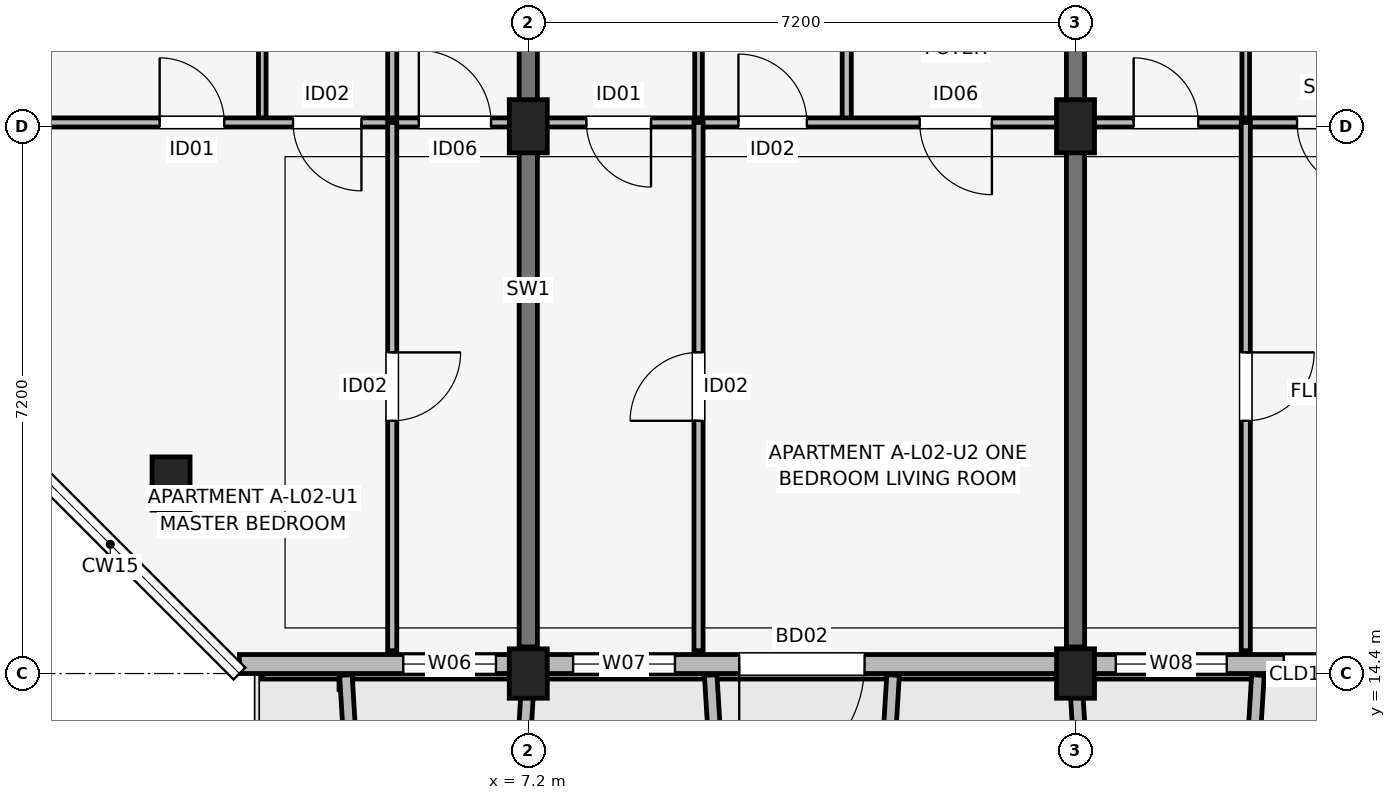
"""IFC4 building model, lengths in metres.
Left out: names, types, materials, properties, quantities, classifications, styles, units other than length and angle.
Written with IfcOpenShell. Run it as: python <this file> out.ifc"""

import sys

from ifc_helpers import new_model, si_unit, direction, frame, frame_2d, origin, origin_2d, place, context, subcontext, project, spatial, rectangle, extrude, element, fill, save


model = new_model("IFC4")
c1 = context("Model", 3, precision=1e-05, world=origin(), true_north=direction((0.0, 1.0)))
c2 = subcontext(c1, "Body", "Model", "MODEL_VIEW")
j1 = project(units=[si_unit("LENGTHUNIT", "METRE"), si_unit("PLANEANGLEUNIT", "RADIAN")], contexts=[c1])
p1 = place(None, origin())
s1 = spatial("IfcSite", under=j1, at=p1, CompositionType="ELEMENT")
p2 = place(p1, origin())
s2 = spatial("IfcBuilding", under=s1, at=p2, CompositionType="ELEMENT")
p3 = place(p2, frame((0.0, 0.0, 8.7)))
s3 = spatial("IfcBuildingStorey", under=s2, at=p3, CompositionType="ELEMENT", Elevation=8.7)
p4 = place(p3, frame((2.5, 16.9, 0.0), z_axis=(0.0, 0.0, 1.0), x_axis=(1.0, 0.0, 0.0)))
e1 = element("IfcColumn", 1, at=p4, inside=s3, PredefinedType="COLUMN", context=c2, shape_type="SweptSolid", body=[
    extrude(rectangle(XDim=0.5, YDim=0.7, at=origin_2d()), origin(), (0.0, 0.0, 1.0), 3.15),
])
p5 = place(p3, frame((7.2, 14.4, 0.0), z_axis=(0.0, 0.0, 1.0), x_axis=(1.0, 0.0, 0.0)))
e2 = element("IfcColumn", 2, at=p5, inside=s3, PredefinedType="COLUMN", context=c2, shape_type="SweptSolid", body=[
    extrude(rectangle(XDim=0.5, YDim=0.65, at=origin_2d()), origin(), (0.0, 0.0, 1.0), 3.15),
])
p6 = place(p3, frame((7.2, 21.6, 0.0), z_axis=(0.0, 0.0, 1.0), x_axis=(1.0, 0.0, 0.0)))
e3 = element("IfcColumn", 3, at=p6, inside=s3, PredefinedType="COLUMN", context=c2, shape_type="SweptSolid", body=[
    extrude(rectangle(XDim=0.5, YDim=0.7, at=origin_2d()), origin(), (0.0, 0.0, 1.0), 3.15),
])
p7 = place(p3, frame((14.4, 14.4, 0.0), z_axis=(0.0, 0.0, 1.0), x_axis=(1.0, 0.0, 0.0)))
e4 = element("IfcColumn", 4, at=p7, inside=s3, PredefinedType="COLUMN", context=c2, shape_type="SweptSolid", body=[
    extrude(rectangle(XDim=0.5, YDim=0.65, at=origin_2d()), origin(), (0.0, 0.0, 1.0), 3.15),
])
p8 = place(p3, frame((14.4, 21.6, 0.0), z_axis=(0.0, 0.0, 1.0), x_axis=(1.0, 0.0, 0.0)))
e5 = element("IfcColumn", 5, at=p8, inside=s3, PredefinedType="COLUMN", context=c2, shape_type="SweptSolid", body=[
    extrude(rectangle(XDim=0.5, YDim=0.7, at=origin_2d()), origin(), (0.0, 0.0, 1.0), 3.15),
])
for number, where, z_axis, x_axis in (
    (6, (7.2, 14.75, 0.0), (0.0, 0.0, 1.0), (0.0, 1.0, 0.0)),
    (7, (14.4, 14.75, 0.0), (0.0, 0.0, 1.0), (0.0, 1.0, 0.0)),
):
    element("IfcWall", number, at=place(p3, frame(where, z_axis=z_axis, x_axis=x_axis)), inside=s3, PredefinedType="SHEAR", context=c2, shape_type="SweptSolid", body=[
        extrude(rectangle(XDim=9.4, YDim=0.24, at=frame_2d((4.7, 0.0))), origin(), (0.0, 0.0, 1.0), 3.15),
    ])
p9 = place(p3, frame((3.4, 14.525, 0.0), z_axis=(0.0, 0.0, 1.0), x_axis=(1.0, 0.0, 0.0)))
e8 = element("IfcWall", 8, at=p9, inside=s3, PredefinedType="SOLIDWALL", context=c2, shape_type="SweptSolid", body=[
    extrude(rectangle(XDim=29.2, YDim=0.25, at=frame_2d((14.6, 0.0))), origin(), (0.0, 0.0, 1.0), 2.43),
])
p10 = place(p9, frame((8.225, 0.0, 0.0), z_axis=(0.0, 0.0, 1.0), x_axis=(-1.0, 0.0, 0.0)))
e9 = element("IfcOpeningElement", 9, at=p10, cuts=e8, PredefinedType="OPENING", context=c2, shape_type="SweptSolid", body=[
    extrude(rectangle(XDim=1.65, YDim=2.15, at=frame_2d((0.825, 1.075))), frame((0.0, 0.135, 0.0), z_axis=(0.0, -1.0, 0.0), x_axis=(1.0, 0.0, 0.0)), (0.0, 0.0, 1.0), 0.27),
])
p11 = place(p9, frame((22.55, 0.0, 0.0), z_axis=(0.0, 0.0, 1.0), x_axis=(-1.0, 0.0, 0.0)))
e10 = element("IfcOpeningElement", 10, at=p11, cuts=e8, PredefinedType="OPENING", context=c2, shape_type="SweptSolid", body=[
    extrude(rectangle(XDim=1.5, YDim=2.15, at=frame_2d((0.75, 1.075))), frame((0.0, 0.135, 0.0), z_axis=(0.0, -1.0, 0.0), x_axis=(1.0, 0.0, 0.0)), (0.0, 0.0, 1.0), 0.27),
])
p12 = place(p9, frame((2.155, 0.0, 0.75)))
e11 = element("IfcOpeningElement", 11, at=p12, cuts=e8, PredefinedType="OPENING", context=c2, shape_type="SweptSolid", body=[
    extrude(rectangle(XDim=1.22, YDim=1.5, at=frame_2d((0.61, 0.75))), frame((0.0, 0.135, 0.0), z_axis=(0.0, -1.0, 0.0), x_axis=(1.0, 0.0, 0.0)), (0.0, 0.0, 1.0), 0.27),
])
p13 = place(p9, frame((4.39, 0.0, 0.75)))
e12 = element("IfcOpeningElement", 12, at=p13, cuts=e8, PredefinedType="OPENING", context=c2, shape_type="SweptSolid", body=[
    extrude(rectangle(XDim=1.34, YDim=1.55, at=frame_2d((0.67, 0.775))), frame((0.0, 0.135, 0.0), z_axis=(0.0, -1.0, 0.0), x_axis=(1.0, 0.0, 0.0)), (0.0, 0.0, 1.0), 0.27),
])
p14 = place(p9, frame((11.53, 0.0, 0.75)))
e13 = element("IfcOpeningElement", 13, at=p14, cuts=e8, PredefinedType="OPENING", context=c2, shape_type="SweptSolid", body=[
    extrude(rectangle(XDim=1.46, YDim=1.55, at=frame_2d((0.73, 0.775))), frame((0.0, 0.135, 0.0), z_axis=(0.0, -1.0, 0.0), x_axis=(1.0, 0.0, 0.0)), (0.0, 0.0, 1.0), 0.27),
])
p15 = place(p9, frame((13.74, 0.0, 0.7)))
e14 = element("IfcOpeningElement", 14, at=p15, cuts=e8, PredefinedType="OPENING", context=c2, shape_type="SweptSolid", body=[
    extrude(rectangle(XDim=1.72, YDim=1.6, at=frame_2d((0.86, 0.8))), frame((0.0, 0.135, 0.0), z_axis=(0.0, -1.0, 0.0), x_axis=(1.0, 0.0, 0.0)), (0.0, 0.0, 1.0), 0.27),
])
p16 = place(p9, frame((26.205, 0.0, 0.75)))
e15 = element("IfcOpeningElement", 15, at=p16, cuts=e8, PredefinedType="OPENING", context=c2, shape_type="SweptSolid", body=[
    extrude(rectangle(XDim=0.72, YDim=1.35, at=frame_2d((0.36, 0.675))), frame((0.0, 0.135, 0.0), z_axis=(0.0, -1.0, 0.0), x_axis=(1.0, 0.0, 0.0)), (0.0, 0.0, 1.0), 0.27),
])
for number, where, z_axis, x_axis in (
    (16, (4.8, 14.38, 0.0), (0.0, 0.0, 1.0), (0.061, -0.998, 0.0)),
    (17, (7.2, 14.38, 0.0), (0.0, 0.0, 1.0), (-0.061, -0.998, 0.0)),
):
    element("IfcWall", number, at=place(p3, frame(where, z_axis=z_axis, x_axis=x_axis)), inside=s3, PredefinedType="ELEMENTEDWALL", context=c2, shape_type="SweptSolid", body=[
        extrude(rectangle(XDim=1.964, YDim=0.165, at=frame_2d((0.982, 0.0))), origin(), (0.0, 0.0, 1.0), 2.95),
    ])
for number, where, z_axis, x_axis in (
    (18, (9.6, 14.38, 0.0), (0.0, 0.0, 1.0), (0.061, -0.998, 0.0)),
    (19, (12.0, 14.38, 0.0), (0.0, 0.0, 1.0), (-0.061, -0.998, 0.0)),
):
    element("IfcWall", number, at=place(p3, frame(where, z_axis=z_axis, x_axis=x_axis)), inside=s3, PredefinedType="ELEMENTEDWALL", context=c2, shape_type="SweptSolid", body=[
        extrude(rectangle(XDim=1.964, YDim=0.165, at=frame_2d((0.982, 0.0))), origin(), (0.0, 0.0, 1.0), 2.55),
    ])
p17 = place(p3, frame((14.4, 14.38, 0.0), z_axis=(0.0, 0.0, 1.0), x_axis=(0.061170732449, -0.998127317276, 0.0)))
e20 = element("IfcWall", 20, at=p17, inside=s3, PredefinedType="ELEMENTEDWALL", context=c2, shape_type="SweptSolid", body=[
    extrude(rectangle(XDim=1.964, YDim=0.165, at=frame_2d((0.982, 0.0))), origin(), (0.0, 0.0, 1.0), 2.95),
])
p18 = place(p3, frame((16.8, 14.38, 0.0), z_axis=(0.0, 0.0, 1.0), x_axis=(-0.061170732449, -0.998127317276, 0.0)))
e21 = element("IfcWall", 21, at=p18, inside=s3, PredefinedType="ELEMENTEDWALL", context=c2, shape_type="SweptSolid", body=[
    extrude(rectangle(XDim=1.964, YDim=0.165, at=frame_2d((0.982, 0.0))), origin(), (0.0, 0.0, 1.0), 2.58),
])
p19 = place(p3, frame((3.7, 21.65, 0.0), z_axis=(0.0, 0.0, 1.0), x_axis=(0.0, 1.0, 0.0)))
e22 = element("IfcWall", 22, at=p19, inside=s3, PredefinedType="PARTITIONING", context=c2, shape_type="SweptSolid", body=[
    extrude(rectangle(XDim=2.65, YDim=0.1, at=frame_2d((1.325, 0.0))), origin(), (0.0, 0.0, 1.0), 2.375),
])
p20 = place(p3, frame((5.41, 21.65, 0.0), z_axis=(0.0, 0.0, 1.0), x_axis=(0.0, 1.0, 0.0)))
e23 = element("IfcWall", 23, at=p20, inside=s3, PredefinedType="PARTITIONING", context=c2, shape_type="SweptSolid", body=[
    extrude(rectangle(XDim=2.65, YDim=0.12, at=frame_2d((1.325, 0.0))), origin(), (0.0, 0.0, 1.0), 2.375),
])
p21 = place(p3, frame((0.14, 21.65, 0.0), z_axis=(0.0, 0.0, 1.0), x_axis=(1.0, 0.0, 0.0)))
e24 = element("IfcWall", 24, at=p21, inside=s3, PredefinedType="PARTITIONING", context=c2, shape_type="SweptSolid", body=[
    extrude(rectangle(XDim=6.92, YDim=0.12, at=frame_2d((3.46, 0.0))), origin(), (0.0, 0.0, 1.0), 2.375),
])
p22 = place(p21, frame((2.21, 0.0, 0.0)))
e25 = element("IfcOpeningElement", 25, at=p22, cuts=e24, PredefinedType="OPENING", context=c2, shape_type="SweptSolid", body=[
    extrude(rectangle(XDim=0.85, YDim=2.08, at=frame_2d((0.425, 1.04))), frame((0.0, 0.07, 0.0), z_axis=(0.0, -1.0, 0.0), x_axis=(1.0, 0.0, 0.0)), (0.0, 0.0, 1.0), 0.14),
])
p23 = place(p21, frame((4.865, 0.0, 0.0), z_axis=(0.0, 0.0, 1.0), x_axis=(-1.0, 0.0, 0.0)))
e26 = element("IfcOpeningElement", 26, at=p23, cuts=e24, PredefinedType="OPENING", context=c2, shape_type="SweptSolid", body=[
    extrude(rectangle(XDim=0.9, YDim=2.08, at=frame_2d((0.45, 1.04))), frame((0.0, 0.07, 0.0), z_axis=(0.0, -1.0, 0.0), x_axis=(1.0, 0.0, 0.0)), (0.0, 0.0, 1.0), 0.14),
])
p24 = place(p21, frame((5.62, 0.0, 0.0)))
e27 = element("IfcOpeningElement", 27, at=p24, cuts=e24, PredefinedType="OPENING", context=c2, shape_type="SweptSolid", body=[
    extrude(rectangle(XDim=0.95, YDim=2.08, at=frame_2d((0.475, 1.04))), frame((0.0, 0.07, 0.0), z_axis=(0.0, -1.0, 0.0), x_axis=(1.0, 0.0, 0.0)), (0.0, 0.0, 1.0), 0.14),
])
p25 = place(p3, frame((5.41, 14.7, 0.0), z_axis=(0.0, 0.0, 1.0), x_axis=(0.0, 1.0, 0.0)))
e28 = element("IfcWall", 28, at=p25, inside=s3, PredefinedType="PARTITIONING", context=c2, shape_type="SweptSolid", body=[
    extrude(rectangle(XDim=6.95, YDim=0.12, at=frame_2d((3.475, 0.0))), origin(), (0.0, 0.0, 1.0), 2.375),
])
p26 = place(p25, frame((3.925, 0.0, 0.0), z_axis=(0.0, 0.0, 1.0), x_axis=(-1.0, 0.0, 0.0)))
e29 = element("IfcOpeningElement", 29, at=p26, cuts=e28, PredefinedType="OPENING", context=c2, shape_type="SweptSolid", body=[
    extrude(rectangle(XDim=0.9, YDim=2.08, at=frame_2d((0.45, 1.04))), frame((0.0, 0.07, 0.0), z_axis=(0.0, -1.0, 0.0), x_axis=(1.0, 0.0, 0.0)), (0.0, 0.0, 1.0), 0.14),
])
p27 = place(p3, frame((9.44, 21.65, 0.0), z_axis=(0.0, 0.0, 1.0), x_axis=(0.0, 1.0, 0.0)))
e30 = element("IfcWall", 30, at=p27, inside=s3, PredefinedType="PARTITIONING", context=c2, shape_type="SweptSolid", body=[
    extrude(rectangle(XDim=2.65, YDim=0.1, at=frame_2d((1.325, 0.0))), origin(), (0.0, 0.0, 1.0), 2.375),
])
p28 = place(p3, frame((11.39, 21.65, 0.0), z_axis=(0.0, 0.0, 1.0), x_axis=(0.0, 1.0, 0.0)))
e31 = element("IfcWall", 31, at=p28, inside=s3, PredefinedType="PARTITIONING", context=c2, shape_type="SweptSolid", body=[
    extrude(rectangle(XDim=2.65, YDim=0.12, at=frame_2d((1.325, 0.0))), origin(), (0.0, 0.0, 1.0), 2.375),
])
p29 = place(p3, frame((7.34, 21.65, 0.0), z_axis=(0.0, 0.0, 1.0), x_axis=(1.0, 0.0, 0.0)))
e32 = element("IfcWall", 32, at=p29, inside=s3, PredefinedType="PARTITIONING", context=c2, shape_type="SweptSolid", body=[
    extrude(rectangle(XDim=6.92, YDim=0.12, at=frame_2d((3.46, 0.0))), origin(), (0.0, 0.0, 1.0), 2.375),
])
p30 = place(p29, frame((1.475, 0.0, 0.0), z_axis=(0.0, 0.0, 1.0), x_axis=(-1.0, 0.0, 0.0)))
e33 = element("IfcOpeningElement", 33, at=p30, cuts=e32, PredefinedType="OPENING", context=c2, shape_type="SweptSolid", body=[
    extrude(rectangle(XDim=0.85, YDim=2.08, at=frame_2d((0.425, 1.04))), frame((0.0, 0.07, 0.0), z_axis=(0.0, -1.0, 0.0), x_axis=(1.0, 0.0, 0.0)), (0.0, 0.0, 1.0), 0.14),
])
p31 = place(p29, frame((2.625, 0.0, 0.0)))
e34 = element("IfcOpeningElement", 34, at=p31, cuts=e32, PredefinedType="OPENING", context=c2, shape_type="SweptSolid", body=[
    extrude(rectangle(XDim=0.9, YDim=2.08, at=frame_2d((0.45, 1.04))), frame((0.0, 0.07, 0.0), z_axis=(0.0, -1.0, 0.0), x_axis=(1.0, 0.0, 0.0)), (0.0, 0.0, 1.0), 0.14),
])
p32 = place(p29, frame((5.96, 0.0, 0.0), z_axis=(0.0, 0.0, 1.0), x_axis=(-1.0, 0.0, 0.0)))
e35 = element("IfcOpeningElement", 35, at=p32, cuts=e32, PredefinedType="OPENING", context=c2, shape_type="SweptSolid", body=[
    extrude(rectangle(XDim=0.95, YDim=2.08, at=frame_2d((0.475, 1.04))), frame((0.0, 0.07, 0.0), z_axis=(0.0, -1.0, 0.0), x_axis=(1.0, 0.0, 0.0)), (0.0, 0.0, 1.0), 0.14),
])
p33 = place(p3, frame((9.44, 14.7, 0.0), z_axis=(0.0, 0.0, 1.0), x_axis=(0.0, 1.0, 0.0)))
e36 = element("IfcWall", 36, at=p33, inside=s3, PredefinedType="PARTITIONING", context=c2, shape_type="SweptSolid", body=[
    extrude(rectangle(XDim=6.95, YDim=0.12, at=frame_2d((3.475, 0.0))), origin(), (0.0, 0.0, 1.0), 2.375),
])
p34 = place(p33, frame((3.025, 0.0, 0.0)))
e37 = element("IfcOpeningElement", 37, at=p34, cuts=e36, PredefinedType="OPENING", context=c2, shape_type="SweptSolid", body=[
    extrude(rectangle(XDim=0.9, YDim=2.08, at=frame_2d((0.45, 1.04))), frame((0.0, 0.07, 0.0), z_axis=(0.0, -1.0, 0.0), x_axis=(1.0, 0.0, 0.0)), (0.0, 0.0, 1.0), 0.14),
])
p35 = place(p3, frame((16.64, 21.65, 0.0), z_axis=(0.0, 0.0, 1.0), x_axis=(0.0, 1.0, 0.0)))
e38 = element("IfcWall", 38, at=p35, inside=s3, PredefinedType="PARTITIONING", context=c2, shape_type="SweptSolid", body=[
    extrude(rectangle(XDim=2.65, YDim=0.1, at=frame_2d((1.325, 0.0))), origin(), (0.0, 0.0, 1.0), 2.375),
])
p36 = place(p3, frame((14.54, 21.65, 0.0), z_axis=(0.0, 0.0, 1.0), x_axis=(1.0, 0.0, 0.0)))
e39 = element("IfcWall", 39, at=p36, inside=s3, PredefinedType="PARTITIONING", context=c2, shape_type="SweptSolid", body=[
    extrude(rectangle(XDim=6.92, YDim=0.12, at=frame_2d((3.46, 0.0))), origin(), (0.0, 0.0, 1.0), 2.375),
])
p37 = place(p36, frame((0.625, 0.0, 0.0)))
e40 = element("IfcOpeningElement", 40, at=p37, cuts=e39, PredefinedType="OPENING", context=c2, shape_type="SweptSolid", body=[
    extrude(rectangle(XDim=0.85, YDim=2.08, at=frame_2d((0.425, 1.04))), frame((0.0, 0.07, 0.0), z_axis=(0.0, -1.0, 0.0), x_axis=(1.0, 0.0, 0.0)), (0.0, 0.0, 1.0), 0.14),
])
p38 = place(p36, frame((3.675, 0.0, 0.0), z_axis=(0.0, 0.0, 1.0), x_axis=(-1.0, 0.0, 0.0)))
e41 = element("IfcOpeningElement", 41, at=p38, cuts=e39, PredefinedType="OPENING", context=c2, shape_type="SweptSolid", body=[
    extrude(rectangle(XDim=0.9, YDim=2.08, at=frame_2d((0.45, 1.04))), frame((0.0, 0.07, 0.0), z_axis=(0.0, -1.0, 0.0), x_axis=(1.0, 0.0, 0.0)), (0.0, 0.0, 1.0), 0.14),
])
p39 = place(p36, frame((5.16, 0.0, 0.0)))
e42 = element("IfcOpeningElement", 42, at=p39, cuts=e39, PredefinedType="OPENING", context=c2, shape_type="SweptSolid", body=[
    extrude(rectangle(XDim=0.95, YDim=2.08, at=frame_2d((0.475, 1.04))), frame((0.0, 0.07, 0.0), z_axis=(0.0, -1.0, 0.0), x_axis=(1.0, 0.0, 0.0)), (0.0, 0.0, 1.0), 0.14),
])
p40 = place(p3, frame((16.64, 14.7, 0.0), z_axis=(0.0, 0.0, 1.0), x_axis=(0.0, 1.0, 0.0)))
e43 = element("IfcWall", 43, at=p40, inside=s3, PredefinedType="PARTITIONING", context=c2, shape_type="SweptSolid", body=[
    extrude(rectangle(XDim=6.95, YDim=0.12, at=frame_2d((3.475, 0.0))), origin(), (0.0, 0.0, 1.0), 2.375),
])
p41 = place(p40, frame((3.925, 0.0, 0.0), z_axis=(0.0, 0.0, 1.0), x_axis=(-1.0, 0.0, 0.0)))
e44 = element("IfcOpeningElement", 44, at=p41, cuts=e43, PredefinedType="OPENING", context=c2, shape_type="SweptSolid", body=[
    extrude(rectangle(XDim=0.9, YDim=2.08, at=frame_2d((0.45, 1.04))), frame((0.0, 0.07, 0.0), z_axis=(0.0, -1.0, 0.0), x_axis=(1.0, 0.0, 0.0)), (0.0, 0.0, 1.0), 0.14),
])
p42 = place(p10, origin())
e45 = element("IfcDoor", 45, at=p42, inside=s3, OperationType="SINGLE_SWING_LEFT", PredefinedType="DOOR", context=c2, shape_type="SweptSolid", body=[
    extrude(rectangle(XDim=1.65, YDim=2.15, at=frame_2d((0.825, 1.075))), frame((0.0, 0.025, 0.0), z_axis=(0.0, -1.0, 0.0), x_axis=(1.0, 0.0, 0.0)), (0.0, 0.0, 1.0), 0.05),
])
fill(e9, e45)
p43 = place(p12, origin())
e46 = element("IfcWindow", 46, at=p43, inside=s3, PartitioningType="SINGLE_PANEL", PredefinedType="WINDOW", context=c2, shape_type="SweptSolid", body=[
    extrude(rectangle(XDim=1.22, YDim=1.5, at=frame_2d((0.61, 0.75))), frame((0.0, 0.03, 0.0), z_axis=(0.0, -1.0, 0.0), x_axis=(1.0, 0.0, 0.0)), (0.0, 0.0, 1.0), 0.06),
])
fill(e11, e46)
p44 = place(p13, origin())
e47 = element("IfcWindow", 47, at=p44, inside=s3, PartitioningType="SINGLE_PANEL", PredefinedType="WINDOW", context=c2, shape_type="SweptSolid", body=[
    extrude(rectangle(XDim=1.34, YDim=1.55, at=frame_2d((0.67, 0.775))), frame((0.0, 0.03, 0.0), z_axis=(0.0, -1.0, 0.0), x_axis=(1.0, 0.0, 0.0)), (0.0, 0.0, 1.0), 0.06),
])
fill(e12, e47)
p45 = place(p14, origin())
e48 = element("IfcWindow", 48, at=p45, inside=s3, PartitioningType="SINGLE_PANEL", PredefinedType="WINDOW", context=c2, shape_type="SweptSolid", body=[
    extrude(rectangle(XDim=1.46, YDim=1.55, at=frame_2d((0.73, 0.775))), frame((0.0, 0.03, 0.0), z_axis=(0.0, -1.0, 0.0), x_axis=(1.0, 0.0, 0.0)), (0.0, 0.0, 1.0), 0.06),
])
fill(e13, e48)
p46 = place(p15, origin())
e49 = element("IfcWindow", 49, at=p46, inside=s3, PartitioningType="SINGLE_PANEL", PredefinedType="WINDOW", context=c2, shape_type="SweptSolid", body=[
    extrude(rectangle(XDim=1.72, YDim=1.6, at=frame_2d((0.86, 0.8))), frame((0.0, 0.03, 0.0), z_axis=(0.0, -1.0, 0.0), x_axis=(1.0, 0.0, 0.0)), (0.0, 0.0, 1.0), 0.06),
])
fill(e14, e49)
p47 = place(p22, origin())
e50 = element("IfcDoor", 50, at=p47, inside=s3, OperationType="SINGLE_SWING_LEFT", PredefinedType="DOOR", context=c2, shape_type="SweptSolid", body=[
    extrude(rectangle(XDim=0.85, YDim=2.08, at=frame_2d((0.425, 1.04))), frame((0.0, 0.025, 0.0), z_axis=(0.0, -1.0, 0.0), x_axis=(1.0, 0.0, 0.0)), (0.0, 0.0, 1.0), 0.05),
])
fill(e25, e50)
p48 = place(p23, origin())
e51 = element("IfcDoor", 51, at=p48, inside=s3, OperationType="SINGLE_SWING_RIGHT", PredefinedType="DOOR", context=c2, shape_type="SweptSolid", body=[
    extrude(rectangle(XDim=0.9, YDim=2.08, at=frame_2d((0.45, 1.04))), frame((0.0, 0.025, 0.0), z_axis=(0.0, -1.0, 0.0), x_axis=(1.0, 0.0, 0.0)), (0.0, 0.0, 1.0), 0.05),
])
fill(e26, e51)
p49 = place(p24, origin())
e52 = element("IfcDoor", 52, at=p49, inside=s3, OperationType="SINGLE_SWING_LEFT", PredefinedType="DOOR", context=c2, shape_type="SweptSolid", body=[
    extrude(rectangle(XDim=0.95, YDim=2.08, at=frame_2d((0.475, 1.04))), frame((0.0, 0.025, 0.0), z_axis=(0.0, -1.0, 0.0), x_axis=(1.0, 0.0, 0.0)), (0.0, 0.0, 1.0), 0.05),
])
fill(e27, e52)
p50 = place(p26, origin())
e53 = element("IfcDoor", 53, at=p50, inside=s3, OperationType="SINGLE_SWING_RIGHT", PredefinedType="DOOR", context=c2, shape_type="SweptSolid", body=[
    extrude(rectangle(XDim=0.9, YDim=2.08, at=frame_2d((0.45, 1.04))), frame((0.0, 0.025, 0.0), z_axis=(0.0, -1.0, 0.0), x_axis=(1.0, 0.0, 0.0)), (0.0, 0.0, 1.0), 0.05),
])
fill(e29, e53)
p51 = place(p30, origin())
e54 = element("IfcDoor", 54, at=p51, inside=s3, OperationType="SINGLE_SWING_RIGHT", PredefinedType="DOOR", context=c2, shape_type="SweptSolid", body=[
    extrude(rectangle(XDim=0.85, YDim=2.08, at=frame_2d((0.425, 1.04))), frame((0.0, 0.025, 0.0), z_axis=(0.0, -1.0, 0.0), x_axis=(1.0, 0.0, 0.0)), (0.0, 0.0, 1.0), 0.05),
])
fill(e33, e54)
p52 = place(p31, origin())
e55 = element("IfcDoor", 55, at=p52, inside=s3, OperationType="SINGLE_SWING_LEFT", PredefinedType="DOOR", context=c2, shape_type="SweptSolid", body=[
    extrude(rectangle(XDim=0.9, YDim=2.08, at=frame_2d((0.45, 1.04))), frame((0.0, 0.025, 0.0), z_axis=(0.0, -1.0, 0.0), x_axis=(1.0, 0.0, 0.0)), (0.0, 0.0, 1.0), 0.05),
])
fill(e34, e55)
p53 = place(p32, origin())
e56 = element("IfcDoor", 56, at=p53, inside=s3, OperationType="SINGLE_SWING_RIGHT", PredefinedType="DOOR", context=c2, shape_type="SweptSolid", body=[
    extrude(rectangle(XDim=0.95, YDim=2.08, at=frame_2d((0.475, 1.04))), frame((0.0, 0.025, 0.0), z_axis=(0.0, -1.0, 0.0), x_axis=(1.0, 0.0, 0.0)), (0.0, 0.0, 1.0), 0.05),
])
fill(e35, e56)
p54 = place(p34, origin())
e57 = element("IfcDoor", 57, at=p54, inside=s3, OperationType="SINGLE_SWING_LEFT", PredefinedType="DOOR", context=c2, shape_type="SweptSolid", body=[
    extrude(rectangle(XDim=0.9, YDim=2.08, at=frame_2d((0.45, 1.04))), frame((0.0, 0.025, 0.0), z_axis=(0.0, -1.0, 0.0), x_axis=(1.0, 0.0, 0.0)), (0.0, 0.0, 1.0), 0.05),
])
fill(e37, e57)
p55 = place(p37, origin())
e58 = element("IfcDoor", 58, at=p55, inside=s3, OperationType="SINGLE_SWING_LEFT", PredefinedType="DOOR", context=c2, shape_type="SweptSolid", body=[
    extrude(rectangle(XDim=0.85, YDim=2.08, at=frame_2d((0.425, 1.04))), frame((0.0, 0.025, 0.0), z_axis=(0.0, -1.0, 0.0), x_axis=(1.0, 0.0, 0.0)), (0.0, 0.0, 1.0), 0.05),
])
fill(e40, e58)
p56 = place(p38, origin())
e59 = element("IfcDoor", 59, at=p56, inside=s3, OperationType="SINGLE_SWING_RIGHT", PredefinedType="DOOR", context=c2, shape_type="SweptSolid", body=[
    extrude(rectangle(XDim=0.9, YDim=2.08, at=frame_2d((0.45, 1.04))), frame((0.0, 0.025, 0.0), z_axis=(0.0, -1.0, 0.0), x_axis=(1.0, 0.0, 0.0)), (0.0, 0.0, 1.0), 0.05),
])
fill(e41, e59)
p57 = place(p41, origin())
e60 = element("IfcDoor", 60, at=p57, inside=s3, OperationType="SINGLE_SWING_RIGHT", PredefinedType="DOOR", context=c2, shape_type="SweptSolid", body=[
    extrude(rectangle(XDim=0.9, YDim=2.08, at=frame_2d((0.45, 1.04))), frame((0.0, 0.025, 0.0), z_axis=(0.0, -1.0, 0.0), x_axis=(1.0, 0.0, 0.0)), (0.0, 0.0, 1.0), 0.05),
])
fill(e44, e60)
save(model, sys.argv[1])
